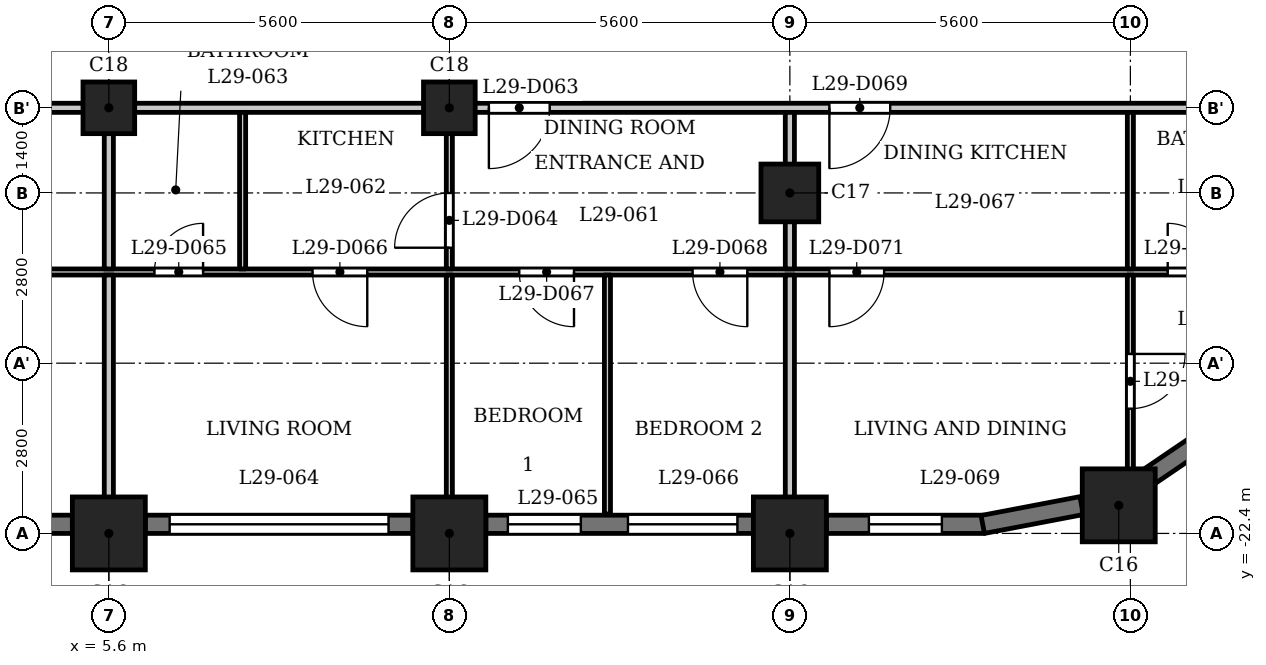
"""IFC4 building model, lengths in metres.
Left out: names, types, materials, properties, quantities, classifications, styles, units other than length and angle.
Written with IfcOpenShell. Run it as: python <this file> out.ifc"""

import sys

from ifc_helpers import new_model, si_unit, direction, frame, frame_2d, origin, origin_2d, place, context, subcontext, project, spatial, rectangle, extrude, element, fill, save


model = new_model("IFC4")
c1 = context("Model", 3, precision=1e-05, world=origin(), true_north=direction((0.0, 1.0)))
c2 = subcontext(c1, "Body", "Model", "MODEL_VIEW")
j1 = project(units=[si_unit("LENGTHUNIT", "METRE"), si_unit("PLANEANGLEUNIT", "RADIAN")], contexts=[c1])
p1 = place(None, origin())
s1 = spatial("IfcSite", under=j1, at=p1, CompositionType="ELEMENT")
p2 = place(p1, origin())
s2 = spatial("IfcBuilding", under=s1, at=p2, CompositionType="ELEMENT")
p3 = place(p2, frame((0.0, 0.0, 114.8)))
s3 = spatial("IfcBuildingStorey", under=s2, at=p3, CompositionType="ELEMENT", Elevation=114.8)
for number, where, z_axis, x_axis in (
    (1, (5.6, -22.4, 0.0), (0.0, 0.0, 1.0), (1.0, 0.0, 0.0)),
    (2, (11.2, -22.4, 0.0), (0.0, 0.0, 1.0), (1.0, 0.0, 0.0)),
    (3, (16.8, -22.4, 0.0), (0.0, 0.0, 1.0), (1.0, 0.0, 0.0)),
    (4, (22.209, -21.938, 0.0), (0.0, 0.0, 1.0), (1.0, 0.0, 0.0)),
):
    element("IfcColumn", number, at=place(p3, frame(where, z_axis=z_axis, x_axis=x_axis)), inside=s3, PredefinedType="COLUMN", context=c2, shape_type="SweptSolid", body=[
        extrude(rectangle(XDim=1.2, YDim=1.2, at=origin_2d()), origin(), (0.0, 0.0, 1.0), 3.5),
    ])
p4 = place(p3, frame((16.8, -16.8, 0.0), z_axis=(0.0, 0.0, 1.0), x_axis=(1.0, 0.0, 0.0)))
e5 = element("IfcColumn", 5, at=p4, inside=s3, PredefinedType="COLUMN", context=c2, shape_type="SweptSolid", body=[
    extrude(rectangle(XDim=0.95, YDim=0.95, at=origin_2d()), origin(), (0.0, 0.0, 1.0), 3.5),
])
for number, where, z_axis, x_axis in (
    (6, (5.6, -15.4, 0.0), (0.0, 0.0, 1.0), (1.0, 0.0, 0.0)),
    (7, (11.2, -15.4, 0.0), (0.0, 0.0, 1.0), (1.0, 0.0, 0.0)),
):
    element("IfcColumn", number, at=place(p3, frame(where, z_axis=z_axis, x_axis=x_axis)), inside=s3, PredefinedType="COLUMN", context=c2, shape_type="SweptSolid", body=[
        extrude(rectangle(XDim=0.85, YDim=0.85, at=origin_2d()), origin(), (0.0, 0.0, 1.0), 3.5),
    ])
p5 = place(p3, frame((0.6, -22.25, 0.0), z_axis=(0.0, 0.0, 1.0), x_axis=(1.0, 0.0, 0.0)))
e8 = element("IfcWall", 8, at=p5, inside=s3, PredefinedType="SOLIDWALL", context=c2, shape_type="SweptSolid", body=[
    extrude(rectangle(XDim=4.4, YDim=0.3, at=frame_2d((2.2, 0.0))), origin(), (0.0, 0.0, 1.0), 2.4),
])
p6 = place(p5, frame((0.4, 0.0, 1.2)))
e9 = element("IfcOpeningElement", 9, at=p6, cuts=e8, PredefinedType="OPENING", context=c2, shape_type="SweptSolid", body=[
    extrude(rectangle(XDim=3.6, YDim=0.95, at=frame_2d((1.8, 0.475))), frame((0.0, 0.16, 0.0), z_axis=(0.0, -1.0, 0.0), x_axis=(1.0, 0.0, 0.0)), (0.0, 0.0, 1.0), 0.32),
])
p7 = place(p3, frame((6.2, -22.25, 0.0), z_axis=(0.0, 0.0, 1.0), x_axis=(1.0, 0.0, 0.0)))
e10 = element("IfcWall", 10, at=p7, inside=s3, PredefinedType="SOLIDWALL", context=c2, shape_type="SweptSolid", body=[
    extrude(rectangle(XDim=4.4, YDim=0.3, at=frame_2d((2.2, 0.0))), origin(), (0.0, 0.0, 1.0), 2.4),
])
p8 = place(p7, frame((0.4, 0.0, 1.2)))
e11 = element("IfcOpeningElement", 11, at=p8, cuts=e10, PredefinedType="OPENING", context=c2, shape_type="SweptSolid", body=[
    extrude(rectangle(XDim=3.6, YDim=0.95, at=frame_2d((1.8, 0.475))), frame((0.0, 0.16, 0.0), z_axis=(0.0, -1.0, 0.0), x_axis=(1.0, 0.0, 0.0)), (0.0, 0.0, 1.0), 0.32),
])
p9 = place(p3, frame((11.8, -22.25, 0.0), z_axis=(0.0, 0.0, 1.0), x_axis=(1.0, 0.0, 0.0)))
e12 = element("IfcWall", 12, at=p9, inside=s3, PredefinedType="SOLIDWALL", context=c2, shape_type="SweptSolid", body=[
    extrude(rectangle(XDim=4.4, YDim=0.3, at=frame_2d((2.2, 0.0))), origin(), (0.0, 0.0, 1.0), 2.4),
])
p10 = place(p9, frame((0.363, 0.0, 0.6)))
e13 = element("IfcOpeningElement", 13, at=p10, cuts=e12, PredefinedType="OPENING", context=c2, shape_type="SweptSolid", body=[
    extrude(rectangle(XDim=1.2, YDim=1.55, at=frame_2d((0.6, 0.775))), frame((0.0, 0.16, 0.0), z_axis=(0.0, -1.0, 0.0), x_axis=(1.0, 0.0, 0.0)), (0.0, 0.0, 1.0), 0.32),
])
p11 = place(p9, frame((2.337, 0.0, 0.9)))
e14 = element("IfcOpeningElement", 14, at=p11, cuts=e12, PredefinedType="OPENING", context=c2, shape_type="SweptSolid", body=[
    extrude(rectangle(XDim=1.8, YDim=1.25, at=frame_2d((0.9, 0.625))), frame((0.0, 0.16, 0.0), z_axis=(0.0, -1.0, 0.0), x_axis=(1.0, 0.0, 0.0)), (0.0, 0.0, 1.0), 0.32),
])
p12 = place(p3, frame((17.4, -22.25, 0.0), z_axis=(0.0, 0.0, 1.0), x_axis=(1.0, 0.0, 0.0)))
e15 = element("IfcWall", 15, at=p12, inside=s3, PredefinedType="SOLIDWALL", context=c2, shape_type="SweptSolid", body=[
    extrude(rectangle(XDim=2.6, YDim=0.3, at=frame_2d((1.3, 0.0))), origin(), (0.0, 0.0, 1.0), 2.4),
])
p13 = place(p12, frame((0.7, 0.0, 0.6)))
e16 = element("IfcOpeningElement", 16, at=p13, cuts=e15, PredefinedType="OPENING", context=c2, shape_type="SweptSolid", body=[
    extrude(rectangle(XDim=1.2, YDim=1.55, at=frame_2d((0.6, 0.775))), frame((0.0, 0.16, 0.0), z_axis=(0.0, -1.0, 0.0), x_axis=(1.0, 0.0, 0.0)), (0.0, 0.0, 1.0), 0.32),
])
for number, where, z_axis, x_axis in (
    (17, (19.972, -22.253, 0.0), (0.0, 0.0, 1.0), (0.982, 0.187, 0.0)),
    (18, (22.643, -21.51, 0.0), (0.0, 0.0, 1.0), (0.827, 0.562, 0.0)),
):
    element("IfcWall", number, at=place(p3, frame(where, z_axis=z_axis, x_axis=x_axis)), inside=s3, PredefinedType="SOLIDWALL", context=c2, shape_type="SweptSolid", body=[
        extrude(rectangle(XDim=1.656, YDim=0.3, at=frame_2d((0.828, 0.0))), origin(), (0.0, 0.0, 1.0), 2.4),
    ])
p14 = place(p3, frame((-26.19, -18.1, 0.0), z_axis=(0.0, 0.0, 1.0), x_axis=(1.0, 0.0, 0.0)))
e19 = element("IfcWall", 19, at=p14, inside=s3, PredefinedType="PARTITIONING", context=c2, shape_type="SweptSolid", body=[
    extrude(rectangle(XDim=52.63, YDim=0.1, at=frame_2d((26.315, 0.0))), origin(), (0.0, 0.0, 1.0), 3.2),
])
p15 = place(p14, frame((1.09, 0.0, 0.0)))
e20 = element("IfcOpeningElement", 20, at=p15, cuts=e19, PredefinedType="OPENING", context=c2, shape_type="SweptSolid", body=[
    extrude(rectangle(XDim=0.8, YDim=2.1, at=frame_2d((0.4, 1.05))), frame((0.0, 0.06, 0.0), z_axis=(0.0, -1.0, 0.0), x_axis=(1.0, 0.0, 0.0)), (0.0, 0.0, 1.0), 0.12),
])
p16 = place(p14, frame((4.44, 0.0, 0.0)))
e21 = element("IfcOpeningElement", 21, at=p16, cuts=e19, PredefinedType="OPENING", context=c2, shape_type="SweptSolid", body=[
    extrude(rectangle(XDim=0.9, YDim=2.1, at=frame_2d((0.45, 1.05))), frame((0.0, 0.06, 0.0), z_axis=(0.0, -1.0, 0.0), x_axis=(1.0, 0.0, 0.0)), (0.0, 0.0, 1.0), 0.12),
])
p17 = place(p14, frame((10.14, 0.0, 0.0)))
e22 = element("IfcOpeningElement", 22, at=p17, cuts=e19, PredefinedType="OPENING", context=c2, shape_type="SweptSolid", body=[
    extrude(rectangle(XDim=0.8, YDim=2.1, at=frame_2d((0.4, 1.05))), frame((0.0, 0.06, 0.0), z_axis=(0.0, -1.0, 0.0), x_axis=(1.0, 0.0, 0.0)), (0.0, 0.0, 1.0), 0.12),
])
p18 = place(p14, frame((12.74, 0.0, 0.0)))
e23 = element("IfcOpeningElement", 23, at=p18, cuts=e19, PredefinedType="OPENING", context=c2, shape_type="SweptSolid", body=[
    extrude(rectangle(XDim=0.9, YDim=2.1, at=frame_2d((0.45, 1.05))), frame((0.0, 0.06, 0.0), z_axis=(0.0, -1.0, 0.0), x_axis=(1.0, 0.0, 0.0)), (0.0, 0.0, 1.0), 0.12),
])
p19 = place(p14, frame((16.14, 0.0, 0.0)))
e24 = element("IfcOpeningElement", 24, at=p19, cuts=e19, PredefinedType="OPENING", context=c2, shape_type="SweptSolid", body=[
    extrude(rectangle(XDim=0.9, YDim=2.1, at=frame_2d((0.45, 1.05))), frame((0.0, 0.06, 0.0), z_axis=(0.0, -1.0, 0.0), x_axis=(1.0, 0.0, 0.0)), (0.0, 0.0, 1.0), 0.12),
])
p20 = place(p14, frame((18.99, 0.0, 0.0)))
e25 = element("IfcOpeningElement", 25, at=p20, cuts=e19, PredefinedType="OPENING", context=c2, shape_type="SweptSolid", body=[
    extrude(rectangle(XDim=0.9, YDim=2.1, at=frame_2d((0.45, 1.05))), frame((0.0, 0.06, 0.0), z_axis=(0.0, -1.0, 0.0), x_axis=(1.0, 0.0, 0.0)), (0.0, 0.0, 1.0), 0.12),
])
p21 = place(p14, frame((26.84, 0.0, 0.0)))
e26 = element("IfcOpeningElement", 26, at=p21, cuts=e19, PredefinedType="OPENING", context=c2, shape_type="SweptSolid", body=[
    extrude(rectangle(XDim=0.8, YDim=2.1, at=frame_2d((0.4, 1.05))), frame((0.0, 0.06, 0.0), z_axis=(0.0, -1.0, 0.0), x_axis=(1.0, 0.0, 0.0)), (0.0, 0.0, 1.0), 0.12),
])
p22 = place(p14, frame((21.24, 0.0, 0.0)))
e27 = element("IfcOpeningElement", 27, at=p22, cuts=e19, PredefinedType="OPENING", context=c2, shape_type="SweptSolid", body=[
    extrude(rectangle(XDim=0.9, YDim=2.1, at=frame_2d((0.45, 1.05))), frame((0.0, 0.06, 0.0), z_axis=(0.0, -1.0, 0.0), x_axis=(1.0, 0.0, 0.0)), (0.0, 0.0, 1.0), 0.12),
])
p23 = place(p14, frame((32.54, 0.0, 0.0)))
e28 = element("IfcOpeningElement", 28, at=p23, cuts=e19, PredefinedType="OPENING", context=c2, shape_type="SweptSolid", body=[
    extrude(rectangle(XDim=0.8, YDim=2.1, at=frame_2d((0.4, 1.05))), frame((0.0, 0.06, 0.0), z_axis=(0.0, -1.0, 0.0), x_axis=(1.0, 0.0, 0.0)), (0.0, 0.0, 1.0), 0.12),
])
p24 = place(p14, frame((35.14, 0.0, 0.0)))
e29 = element("IfcOpeningElement", 29, at=p24, cuts=e19, PredefinedType="OPENING", context=c2, shape_type="SweptSolid", body=[
    extrude(rectangle(XDim=0.9, YDim=2.1, at=frame_2d((0.45, 1.05))), frame((0.0, 0.06, 0.0), z_axis=(0.0, -1.0, 0.0), x_axis=(1.0, 0.0, 0.0)), (0.0, 0.0, 1.0), 0.12),
])
p25 = place(p14, frame((38.54, 0.0, 0.0)))
e30 = element("IfcOpeningElement", 30, at=p25, cuts=e19, PredefinedType="OPENING", context=c2, shape_type="SweptSolid", body=[
    extrude(rectangle(XDim=0.9, YDim=2.1, at=frame_2d((0.45, 1.05))), frame((0.0, 0.06, 0.0), z_axis=(0.0, -1.0, 0.0), x_axis=(1.0, 0.0, 0.0)), (0.0, 0.0, 1.0), 0.12),
])
p26 = place(p14, frame((41.39, 0.0, 0.0)))
e31 = element("IfcOpeningElement", 31, at=p26, cuts=e19, PredefinedType="OPENING", context=c2, shape_type="SweptSolid", body=[
    extrude(rectangle(XDim=0.9, YDim=2.1, at=frame_2d((0.45, 1.05))), frame((0.0, 0.06, 0.0), z_axis=(0.0, -1.0, 0.0), x_axis=(1.0, 0.0, 0.0)), (0.0, 0.0, 1.0), 0.12),
])
p27 = place(p14, frame((49.204, 0.0, 0.0)))
e32 = element("IfcOpeningElement", 32, at=p27, cuts=e19, PredefinedType="OPENING", context=c2, shape_type="SweptSolid", body=[
    extrude(rectangle(XDim=0.8, YDim=2.1, at=frame_2d((0.4, 1.05))), frame((0.0, 0.06, 0.0), z_axis=(0.0, -1.0, 0.0), x_axis=(1.0, 0.0, 0.0)), (0.0, 0.0, 1.0), 0.12),
])
p28 = place(p14, frame((43.64, 0.0, 0.0)))
e33 = element("IfcOpeningElement", 33, at=p28, cuts=e19, PredefinedType="OPENING", context=c2, shape_type="SweptSolid", body=[
    extrude(rectangle(XDim=0.9, YDim=2.1, at=frame_2d((0.45, 1.05))), frame((0.0, 0.06, 0.0), z_axis=(0.0, -1.0, 0.0), x_axis=(1.0, 0.0, 0.0)), (0.0, 0.0, 1.0), 0.12),
])
p29 = place(p3, frame((-27.484, -15.4, 0.0), z_axis=(0.0, 0.0, 1.0), x_axis=(1.0, 0.0, 0.0)))
e34 = element("IfcWall", 34, at=p29, inside=s3, PredefinedType="PARTITIONING", context=c2, shape_type="SweptSolid", body=[
    extrude(rectangle(XDim=54.968, YDim=0.15, at=frame_2d((27.484, 0.0))), origin(), (0.0, 0.0, 1.0), 3.2),
])
p30 = place(p29, frame((5.734, 0.0, 0.0)))
e35 = element("IfcOpeningElement", 35, at=p30, cuts=e34, PredefinedType="OPENING", context=c2, shape_type="SweptSolid", body=[
    extrude(rectangle(XDim=1.0, YDim=2.1, at=frame_2d((0.5, 1.05))), frame((0.0, 0.085, 0.0), z_axis=(0.0, -1.0, 0.0), x_axis=(1.0, 0.0, 0.0)), (0.0, 0.0, 1.0), 0.17),
])
p31 = place(p29, frame((16.934, 0.0, 0.0)))
e36 = element("IfcOpeningElement", 36, at=p31, cuts=e34, PredefinedType="OPENING", context=c2, shape_type="SweptSolid", body=[
    extrude(rectangle(XDim=1.0, YDim=2.1, at=frame_2d((0.5, 1.05))), frame((0.0, 0.085, 0.0), z_axis=(0.0, -1.0, 0.0), x_axis=(1.0, 0.0, 0.0)), (0.0, 0.0, 1.0), 0.17),
])
p32 = place(p29, frame((22.534, 0.0, 0.0)))
e37 = element("IfcOpeningElement", 37, at=p32, cuts=e34, PredefinedType="OPENING", context=c2, shape_type="SweptSolid", body=[
    extrude(rectangle(XDim=1.0, YDim=2.1, at=frame_2d((0.5, 1.05))), frame((0.0, 0.085, 0.0), z_axis=(0.0, -1.0, 0.0), x_axis=(1.0, 0.0, 0.0)), (0.0, 0.0, 1.0), 0.17),
])
p33 = place(p29, frame((39.334, 0.0, 0.0)))
e38 = element("IfcOpeningElement", 38, at=p33, cuts=e34, PredefinedType="OPENING", context=c2, shape_type="SweptSolid", body=[
    extrude(rectangle(XDim=1.0, YDim=2.1, at=frame_2d((0.5, 1.05))), frame((0.0, 0.085, 0.0), z_axis=(0.0, -1.0, 0.0), x_axis=(1.0, 0.0, 0.0)), (0.0, 0.0, 1.0), 0.17),
])
p34 = place(p29, frame((44.934, 0.0, 0.0)))
e39 = element("IfcOpeningElement", 39, at=p34, cuts=e34, PredefinedType="OPENING", context=c2, shape_type="SweptSolid", body=[
    extrude(rectangle(XDim=1.0, YDim=2.1, at=frame_2d((0.5, 1.05))), frame((0.0, 0.085, 0.0), z_axis=(0.0, -1.0, 0.0), x_axis=(1.0, 0.0, 0.0)), (0.0, 0.0, 1.0), 0.17),
])
p35 = place(p3, frame((5.6, -22.98, 0.0), z_axis=(0.0, 0.0, 1.0), x_axis=(0.0, 1.0, 0.0)))
e40 = element("IfcWall", 40, at=p35, inside=s3, PredefinedType="PARTITIONING", context=c2, shape_type="SweptSolid", body=[
    extrude(rectangle(XDim=4.83, YDim=0.15, at=frame_2d((2.415, 0.0))), origin(), (0.0, 0.0, 1.0), 3.2),
])
p36 = place(p3, frame((5.6, -18.05, 0.0), z_axis=(0.0, 0.0, 1.0), x_axis=(0.0, 1.0, 0.0)))
e41 = element("IfcWall", 41, at=p36, inside=s3, PredefinedType="PARTITIONING", context=c2, shape_type="SweptSolid", body=[
    extrude(rectangle(XDim=2.575, YDim=0.15, at=frame_2d((1.288, 0.0))), origin(), (0.0, 0.0, 1.0), 3.2),
])
p37 = place(p3, frame((7.8, -18.05, 0.0), z_axis=(0.0, 0.0, 1.0), x_axis=(0.0, 1.0, 0.0)))
e42 = element("IfcWall", 42, at=p37, inside=s3, PredefinedType="PARTITIONING", context=c2, shape_type="SweptSolid", body=[
    extrude(rectangle(XDim=2.575, YDim=0.1, at=frame_2d((1.288, 0.0))), origin(), (0.0, 0.0, 1.0), 3.2),
])
p38 = place(p3, frame((11.2, -22.98, 0.0), z_axis=(0.0, 0.0, 1.0), x_axis=(0.0, 1.0, 0.0)))
e43 = element("IfcWall", 43, at=p38, inside=s3, PredefinedType="PARTITIONING", context=c2, shape_type="SweptSolid", body=[
    extrude(rectangle(XDim=4.83, YDim=0.1, at=frame_2d((2.415, 0.0))), origin(), (0.0, 0.0, 1.0), 3.2),
])
p39 = place(p3, frame((11.2, -18.05, 0.0), z_axis=(0.0, 0.0, 1.0), x_axis=(0.0, 1.0, 0.0)))
e44 = element("IfcWall", 44, at=p39, inside=s3, PredefinedType="PARTITIONING", context=c2, shape_type="SweptSolid", body=[
    extrude(rectangle(XDim=2.575, YDim=0.1, at=frame_2d((1.288, 0.0))), origin(), (0.0, 0.0, 1.0), 3.2),
])
p40 = place(p39, frame((0.349, 0.0, 0.0)))
e45 = element("IfcOpeningElement", 45, at=p40, cuts=e44, PredefinedType="OPENING", context=c2, shape_type="SweptSolid", body=[
    extrude(rectangle(XDim=0.9, YDim=2.1, at=frame_2d((0.45, 1.05))), frame((0.0, 0.06, 0.0), z_axis=(0.0, -1.0, 0.0), x_axis=(1.0, 0.0, 0.0)), (0.0, 0.0, 1.0), 0.12),
])
p41 = place(p3, frame((13.8, -22.08, 0.0), z_axis=(0.0, 0.0, 1.0), x_axis=(0.0, 1.0, 0.0)))
e46 = element("IfcWall", 46, at=p41, inside=s3, PredefinedType="PARTITIONING", context=c2, shape_type="SweptSolid", body=[
    extrude(rectangle(XDim=3.93, YDim=0.1, at=frame_2d((1.965, 0.0))), origin(), (0.0, 0.0, 1.0), 3.2),
])
p42 = place(p3, frame((16.8, -22.98, 0.0), z_axis=(0.0, 0.0, 1.0), x_axis=(0.0, 1.0, 0.0)))
e47 = element("IfcWall", 47, at=p42, inside=s3, PredefinedType="PARTITIONING", context=c2, shape_type="SweptSolid", body=[
    extrude(rectangle(XDim=4.83, YDim=0.15, at=frame_2d((2.415, 0.0))), origin(), (0.0, 0.0, 1.0), 3.2),
])
p43 = place(p3, frame((16.8, -18.05, 0.0), z_axis=(0.0, 0.0, 1.0), x_axis=(0.0, 1.0, 0.0)))
e48 = element("IfcWall", 48, at=p43, inside=s3, PredefinedType="PARTITIONING", context=c2, shape_type="SweptSolid", body=[
    extrude(rectangle(XDim=2.575, YDim=0.15, at=frame_2d((1.288, 0.0))), origin(), (0.0, 0.0, 1.0), 3.2),
])
p44 = place(p3, frame((22.4, -21.72, 0.0), z_axis=(0.0, 0.0, 1.0), x_axis=(0.0, 1.0, 0.0)))
e49 = element("IfcWall", 49, at=p44, inside=s3, PredefinedType="PARTITIONING", context=c2, shape_type="SweptSolid", body=[
    extrude(rectangle(XDim=3.57, YDim=0.1, at=frame_2d((1.785, 0.0))), origin(), (0.0, 0.0, 1.0), 3.2),
])
p45 = place(p44, frame((1.372, 0.0, 0.0)))
e50 = element("IfcOpeningElement", 50, at=p45, cuts=e49, PredefinedType="OPENING", context=c2, shape_type="SweptSolid", body=[
    extrude(rectangle(XDim=0.9, YDim=2.1, at=frame_2d((0.45, 1.05))), frame((0.0, 0.06, 0.0), z_axis=(0.0, -1.0, 0.0), x_axis=(1.0, 0.0, 0.0)), (0.0, 0.0, 1.0), 0.12),
])
p46 = place(p3, frame((22.4, -18.05, 0.0), z_axis=(0.0, 0.0, 1.0), x_axis=(0.0, 1.0, 0.0)))
e51 = element("IfcWall", 51, at=p46, inside=s3, PredefinedType="PARTITIONING", context=c2, shape_type="SweptSolid", body=[
    extrude(rectangle(XDim=2.575, YDim=0.1, at=frame_2d((1.288, 0.0))), origin(), (0.0, 0.0, 1.0), 3.2),
])
p47 = place(p33, origin())
e52 = element("IfcDoor", 52, at=p47, inside=s3, OperationType="SINGLE_SWING_LEFT", PredefinedType="DOOR", context=c2, shape_type="SweptSolid", body=[
    extrude(rectangle(XDim=1.0, YDim=2.1, at=frame_2d((0.5, 1.05))), frame((0.0, 0.025, 0.0), z_axis=(0.0, -1.0, 0.0), x_axis=(1.0, 0.0, 0.0)), (0.0, 0.0, 1.0), 0.05),
])
fill(e38, e52)
p48 = place(p40, origin())
e53 = element("IfcDoor", 53, at=p48, inside=s3, OperationType="SINGLE_SWING_RIGHT", PredefinedType="DOOR", context=c2, shape_type="SweptSolid", body=[
    extrude(rectangle(XDim=0.9, YDim=2.1, at=frame_2d((0.45, 1.05))), frame((0.0, 0.025, 0.0), z_axis=(0.0, -1.0, 0.0), x_axis=(1.0, 0.0, 0.0)), (0.0, 0.0, 1.0), 0.05),
])
fill(e45, e53)
p49 = place(p23, origin())
e54 = element("IfcDoor", 54, at=p49, inside=s3, OperationType="SINGLE_SWING_LEFT", PredefinedType="DOOR", context=c2, shape_type="SweptSolid", body=[
    extrude(rectangle(XDim=0.8, YDim=2.1, at=frame_2d((0.4, 1.05))), frame((0.0, 0.025, 0.0), z_axis=(0.0, -1.0, 0.0), x_axis=(1.0, 0.0, 0.0)), (0.0, 0.0, 1.0), 0.05),
])
fill(e28, e54)
p50 = place(p24, origin())
e55 = element("IfcDoor", 55, at=p50, inside=s3, OperationType="SINGLE_SWING_RIGHT", PredefinedType="DOOR", context=c2, shape_type="SweptSolid", body=[
    extrude(rectangle(XDim=0.9, YDim=2.1, at=frame_2d((0.45, 1.05))), frame((0.0, 0.025, 0.0), z_axis=(0.0, -1.0, 0.0), x_axis=(1.0, 0.0, 0.0)), (0.0, 0.0, 1.0), 0.05),
])
fill(e29, e55)
p51 = place(p25, origin())
e56 = element("IfcDoor", 56, at=p51, inside=s3, OperationType="SINGLE_SWING_RIGHT", PredefinedType="DOOR", context=c2, shape_type="SweptSolid", body=[
    extrude(rectangle(XDim=0.9, YDim=2.1, at=frame_2d((0.45, 1.05))), frame((0.0, 0.025, 0.0), z_axis=(0.0, -1.0, 0.0), x_axis=(1.0, 0.0, 0.0)), (0.0, 0.0, 1.0), 0.05),
])
fill(e30, e56)
p52 = place(p26, origin())
e57 = element("IfcDoor", 57, at=p52, inside=s3, OperationType="SINGLE_SWING_RIGHT", PredefinedType="DOOR", context=c2, shape_type="SweptSolid", body=[
    extrude(rectangle(XDim=0.9, YDim=2.1, at=frame_2d((0.45, 1.05))), frame((0.0, 0.025, 0.0), z_axis=(0.0, -1.0, 0.0), x_axis=(1.0, 0.0, 0.0)), (0.0, 0.0, 1.0), 0.05),
])
fill(e31, e57)
p53 = place(p34, origin())
e58 = element("IfcDoor", 58, at=p53, inside=s3, OperationType="SINGLE_SWING_LEFT", PredefinedType="DOOR", context=c2, shape_type="SweptSolid", body=[
    extrude(rectangle(XDim=1.0, YDim=2.1, at=frame_2d((0.5, 1.05))), frame((0.0, 0.025, 0.0), z_axis=(0.0, -1.0, 0.0), x_axis=(1.0, 0.0, 0.0)), (0.0, 0.0, 1.0), 0.05),
])
fill(e39, e58)
p54 = place(p27, origin())
e59 = element("IfcDoor", 59, at=p54, inside=s3, OperationType="SINGLE_SWING_RIGHT", PredefinedType="DOOR", context=c2, shape_type="SweptSolid", body=[
    extrude(rectangle(XDim=0.8, YDim=2.1, at=frame_2d((0.4, 1.05))), frame((0.0, 0.025, 0.0), z_axis=(0.0, -1.0, 0.0), x_axis=(1.0, 0.0, 0.0)), (0.0, 0.0, 1.0), 0.05),
])
fill(e32, e59)
p55 = place(p28, origin())
e60 = element("IfcDoor", 60, at=p55, inside=s3, OperationType="SINGLE_SWING_LEFT", PredefinedType="DOOR", context=c2, shape_type="SweptSolid", body=[
    extrude(rectangle(XDim=0.9, YDim=2.1, at=frame_2d((0.45, 1.05))), frame((0.0, 0.025, 0.0), z_axis=(0.0, -1.0, 0.0), x_axis=(1.0, 0.0, 0.0)), (0.0, 0.0, 1.0), 0.05),
])
fill(e33, e60)
p56 = place(p45, origin())
e61 = element("IfcDoor", 61, at=p56, inside=s3, OperationType="SINGLE_SWING_RIGHT", PredefinedType="DOOR", context=c2, shape_type="SweptSolid", body=[
    extrude(rectangle(XDim=0.9, YDim=2.1, at=frame_2d((0.45, 1.05))), frame((0.0, 0.025, 0.0), z_axis=(0.0, -1.0, 0.0), x_axis=(1.0, 0.0, 0.0)), (0.0, 0.0, 1.0), 0.05),
])
fill(e50, e61)
p57 = place(p8, origin())
e62 = element("IfcWindow", 62, at=p57, inside=s3, PartitioningType="SINGLE_PANEL", PredefinedType="WINDOW", context=c2, shape_type="SweptSolid", body=[
    extrude(rectangle(XDim=3.6, YDim=0.95, at=frame_2d((1.8, 0.475))), frame((0.0, 0.03, 0.0), z_axis=(0.0, -1.0, 0.0), x_axis=(1.0, 0.0, 0.0)), (0.0, 0.0, 1.0), 0.06),
])
fill(e11, e62)
p58 = place(p10, origin())
e63 = element("IfcWindow", 63, at=p58, inside=s3, PartitioningType="SINGLE_PANEL", PredefinedType="WINDOW", context=c2, shape_type="SweptSolid", body=[
    extrude(rectangle(XDim=1.2, YDim=1.55, at=frame_2d((0.6, 0.775))), frame((0.0, 0.03, 0.0), z_axis=(0.0, -1.0, 0.0), x_axis=(1.0, 0.0, 0.0)), (0.0, 0.0, 1.0), 0.06),
])
fill(e13, e63)
p59 = place(p11, origin())
e64 = element("IfcWindow", 64, at=p59, inside=s3, PartitioningType="SINGLE_PANEL", PredefinedType="WINDOW", context=c2, shape_type="SweptSolid", body=[
    extrude(rectangle(XDim=1.8, YDim=1.25, at=frame_2d((0.9, 0.625))), frame((0.0, 0.03, 0.0), z_axis=(0.0, -1.0, 0.0), x_axis=(1.0, 0.0, 0.0)), (0.0, 0.0, 1.0), 0.06),
])
fill(e14, e64)
p60 = place(p13, origin())
e65 = element("IfcWindow", 65, at=p60, inside=s3, PartitioningType="SINGLE_PANEL", PredefinedType="WINDOW", context=c2, shape_type="SweptSolid", body=[
    extrude(rectangle(XDim=1.2, YDim=1.55, at=frame_2d((0.6, 0.775))), frame((0.0, 0.03, 0.0), z_axis=(0.0, -1.0, 0.0), x_axis=(1.0, 0.0, 0.0)), (0.0, 0.0, 1.0), 0.06),
])
fill(e16, e65)
save(model, sys.argv[1])
